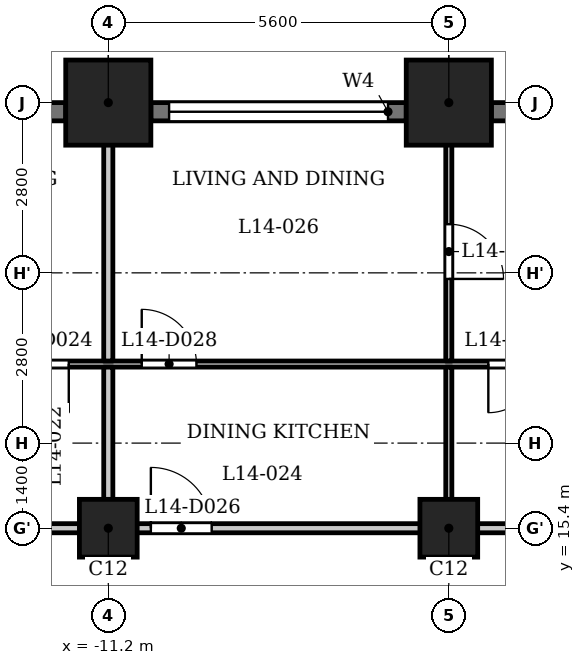
"""IFC4 building model, lengths in metres.
Left out: names, types, materials, properties, quantities, classifications, styles, units other than length and angle.
Written with IfcOpenShell. Run it as: python <this file> out.ifc"""

import sys

from ifc_helpers import new_model, si_unit, direction, frame, frame_2d, origin, origin_2d, place, context, subcontext, project, spatial, rectangle, extrude, element, fill, save


model = new_model("IFC4")
c1 = context("Model", 3, precision=1e-05, world=origin(), true_north=direction((0.0, 1.0)))
c2 = subcontext(c1, "Body", "Model", "MODEL_VIEW")
j1 = project(units=[si_unit("LENGTHUNIT", "METRE"), si_unit("PLANEANGLEUNIT", "RADIAN")], contexts=[c1])
p1 = place(None, origin())
s1 = spatial("IfcSite", under=j1, at=p1, CompositionType="ELEMENT")
p2 = place(p1, origin())
s2 = spatial("IfcBuilding", under=s1, at=p2, CompositionType="ELEMENT")
p3 = place(p2, frame((0.0, 0.0, 58.5)))
s3 = spatial("IfcBuildingStorey", under=s2, at=p3, CompositionType="ELEMENT", Elevation=58.5)
for number, where, z_axis, x_axis in (
    (1, (-5.6, 22.4, 0.0), (0.0, 0.0, 1.0), (1.0, 0.0, 0.0)),
    (2, (-11.2, 22.4, 0.0), (0.0, 0.0, 1.0), (1.0, 0.0, 0.0)),
):
    element("IfcColumn", number, at=place(p3, frame(where, z_axis=z_axis, x_axis=x_axis)), inside=s3, PredefinedType="COLUMN", context=c2, shape_type="SweptSolid", body=[
        extrude(rectangle(XDim=1.4, YDim=1.4, at=origin_2d()), origin(), (0.0, 0.0, 1.0), 3.5),
    ])
for number, where, z_axis, x_axis in (
    (3, (-11.2, 15.4, 0.0), (0.0, 0.0, 1.0), (1.0, 0.0, 0.0)),
    (4, (-5.6, 15.4, 0.0), (0.0, 0.0, 1.0), (1.0, 0.0, 0.0)),
):
    element("IfcColumn", number, at=place(p3, frame(where, z_axis=z_axis, x_axis=x_axis)), inside=s3, PredefinedType="COLUMN", context=c2, shape_type="SweptSolid", body=[
        extrude(rectangle(XDim=0.95, YDim=0.95, at=origin_2d()), origin(), (0.0, 0.0, 1.0), 3.5),
    ])
p4 = place(p3, frame((-0.7, 22.25, 0.0), z_axis=(0.0, 0.0, 1.0), x_axis=(-1.0, 0.0, 0.0)))
e5 = element("IfcWall", 5, at=p4, inside=s3, PredefinedType="SOLIDWALL", context=c2, shape_type="SweptSolid", body=[
    extrude(rectangle(XDim=4.2, YDim=0.3, at=frame_2d((2.1, 0.0))), origin(), (0.0, 0.0, 1.0), 2.35),
])
p5 = place(p4, frame((0.3, 0.0, 1.2)))
e6 = element("IfcOpeningElement", 6, at=p5, cuts=e5, PredefinedType="OPENING", context=c2, shape_type="SweptSolid", body=[
    extrude(rectangle(XDim=3.6, YDim=0.95, at=frame_2d((1.8, 0.475))), frame((0.0, 0.16, 0.0), z_axis=(0.0, -1.0, 0.0), x_axis=(1.0, 0.0, 0.0)), (0.0, 0.0, 1.0), 0.32),
])
p6 = place(p3, frame((-6.3, 22.25, 0.0), z_axis=(0.0, 0.0, 1.0), x_axis=(-1.0, 0.0, 0.0)))
e7 = element("IfcWall", 7, at=p6, inside=s3, PredefinedType="SOLIDWALL", context=c2, shape_type="SweptSolid", body=[
    extrude(rectangle(XDim=4.2, YDim=0.3, at=frame_2d((2.1, 0.0))), origin(), (0.0, 0.0, 1.0), 2.35),
])
p7 = place(p6, frame((0.3, 0.0, 1.2)))
e8 = element("IfcOpeningElement", 8, at=p7, cuts=e7, PredefinedType="OPENING", context=c2, shape_type="SweptSolid", body=[
    extrude(rectangle(XDim=3.6, YDim=0.95, at=frame_2d((1.8, 0.475))), frame((0.0, 0.16, 0.0), z_axis=(0.0, -1.0, 0.0), x_axis=(1.0, 0.0, 0.0)), (0.0, 0.0, 1.0), 0.32),
])
p8 = place(p3, frame((-11.9, 22.25, 0.0), z_axis=(0.0, 0.0, 1.0), x_axis=(-1.0, 0.0, 0.0)))
e9 = element("IfcWall", 9, at=p8, inside=s3, PredefinedType="SOLIDWALL", context=c2, shape_type="SweptSolid", body=[
    extrude(rectangle(XDim=4.2, YDim=0.3, at=frame_2d((2.1, 0.0))), origin(), (0.0, 0.0, 1.0), 2.35),
])
p9 = place(p8, frame((0.3, 0.0, 1.2)))
e10 = element("IfcOpeningElement", 10, at=p9, cuts=e9, PredefinedType="OPENING", context=c2, shape_type="SweptSolid", body=[
    extrude(rectangle(XDim=3.6, YDim=0.95, at=frame_2d((1.8, 0.475))), frame((0.0, 0.16, 0.0), z_axis=(0.0, -1.0, 0.0), x_axis=(1.0, 0.0, 0.0)), (0.0, 0.0, 1.0), 0.32),
])
p10 = place(p3, frame((-27.484, 15.4, 0.0), z_axis=(0.0, 0.0, 1.0), x_axis=(1.0, 0.0, 0.0)))
e11 = element("IfcWall", 11, at=p10, inside=s3, PredefinedType="PARTITIONING", context=c2, shape_type="SweptSolid", body=[
    extrude(rectangle(XDim=54.968, YDim=0.15, at=frame_2d((27.484, 0.0))), origin(), (0.0, 0.0, 1.0), 3.2),
])
p11 = place(p10, frame((8.784, 0.0, 0.0)))
e12 = element("IfcOpeningElement", 12, at=p11, cuts=e11, PredefinedType="OPENING", context=c2, shape_type="SweptSolid", body=[
    extrude(rectangle(XDim=1.0, YDim=2.1, at=frame_2d((0.5, 1.05))), frame((0.0, 0.085, 0.0), z_axis=(0.0, -1.0, 0.0), x_axis=(1.0, 0.0, 0.0)), (0.0, 0.0, 1.0), 0.17),
])
p12 = place(p10, frame((12.034, 0.0, 0.0)))
e13 = element("IfcOpeningElement", 13, at=p12, cuts=e11, PredefinedType="OPENING", context=c2, shape_type="SweptSolid", body=[
    extrude(rectangle(XDim=1.0, YDim=2.1, at=frame_2d((0.5, 1.05))), frame((0.0, 0.085, 0.0), z_axis=(0.0, -1.0, 0.0), x_axis=(1.0, 0.0, 0.0)), (0.0, 0.0, 1.0), 0.17),
])
p13 = place(p10, frame((16.984, 0.0, 0.0)))
e14 = element("IfcOpeningElement", 14, at=p13, cuts=e11, PredefinedType="OPENING", context=c2, shape_type="SweptSolid", body=[
    extrude(rectangle(XDim=1.0, YDim=2.1, at=frame_2d((0.5, 1.05))), frame((0.0, 0.085, 0.0), z_axis=(0.0, -1.0, 0.0), x_axis=(1.0, 0.0, 0.0)), (0.0, 0.0, 1.0), 0.17),
])
p14 = place(p10, frame((28.184, 0.0, 0.0)))
e15 = element("IfcOpeningElement", 15, at=p14, cuts=e11, PredefinedType="OPENING", context=c2, shape_type="SweptSolid", body=[
    extrude(rectangle(XDim=1.0, YDim=2.1, at=frame_2d((0.5, 1.05))), frame((0.0, 0.085, 0.0), z_axis=(0.0, -1.0, 0.0), x_axis=(1.0, 0.0, 0.0)), (0.0, 0.0, 1.0), 0.17),
])
p15 = place(p10, frame((48.234, 0.0, 0.0)))
e16 = element("IfcOpeningElement", 16, at=p15, cuts=e11, PredefinedType="OPENING", context=c2, shape_type="SweptSolid", body=[
    extrude(rectangle(XDim=1.0, YDim=2.1, at=frame_2d((0.5, 1.05))), frame((0.0, 0.085, 0.0), z_axis=(0.0, -1.0, 0.0), x_axis=(1.0, 0.0, 0.0)), (0.0, 0.0, 1.0), 0.17),
])
p16 = place(p3, frame((-26.44, 18.1, 0.0), z_axis=(0.0, 0.0, 1.0), x_axis=(1.0, 0.0, 0.0)))
e17 = element("IfcWall", 17, at=p16, inside=s3, PredefinedType="PARTITIONING", context=c2, shape_type="SweptSolid", body=[
    extrude(rectangle(XDim=52.63, YDim=0.1, at=frame_2d((26.315, 0.0))), origin(), (0.0, 0.0, 1.0), 3.2),
])
p17 = place(p16, frame((2.626, 0.0, 0.0)))
e18 = element("IfcOpeningElement", 18, at=p17, cuts=e17, PredefinedType="OPENING", context=c2, shape_type="SweptSolid", body=[
    extrude(rectangle(XDim=0.8, YDim=2.1, at=frame_2d((0.4, 1.05))), frame((0.0, 0.06, 0.0), z_axis=(0.0, -1.0, 0.0), x_axis=(1.0, 0.0, 0.0)), (0.0, 0.0, 1.0), 0.12),
])
p18 = place(p16, frame((7.84, 0.0, 0.0)))
e19 = element("IfcOpeningElement", 19, at=p18, cuts=e17, PredefinedType="OPENING", context=c2, shape_type="SweptSolid", body=[
    extrude(rectangle(XDim=0.9, YDim=2.1, at=frame_2d((0.45, 1.05))), frame((0.0, 0.06, 0.0), z_axis=(0.0, -1.0, 0.0), x_axis=(1.0, 0.0, 0.0)), (0.0, 0.0, 1.0), 0.12),
])
p19 = place(p16, frame((13.79, 0.0, 0.0)))
e20 = element("IfcOpeningElement", 20, at=p19, cuts=e17, PredefinedType="OPENING", context=c2, shape_type="SweptSolid", body=[
    extrude(rectangle(XDim=0.8, YDim=2.1, at=frame_2d((0.4, 1.05))), frame((0.0, 0.06, 0.0), z_axis=(0.0, -1.0, 0.0), x_axis=(1.0, 0.0, 0.0)), (0.0, 0.0, 1.0), 0.12),
])
p20 = place(p16, frame((11.09, 0.0, 0.0)))
e21 = element("IfcOpeningElement", 21, at=p20, cuts=e17, PredefinedType="OPENING", context=c2, shape_type="SweptSolid", body=[
    extrude(rectangle(XDim=0.9, YDim=2.1, at=frame_2d((0.45, 1.05))), frame((0.0, 0.06, 0.0), z_axis=(0.0, -1.0, 0.0), x_axis=(1.0, 0.0, 0.0)), (0.0, 0.0, 1.0), 0.12),
])
p21 = place(p16, frame((21.49, 0.0, 0.0)))
e22 = element("IfcOpeningElement", 22, at=p21, cuts=e17, PredefinedType="OPENING", context=c2, shape_type="SweptSolid", body=[
    extrude(rectangle(XDim=0.8, YDim=2.1, at=frame_2d((0.4, 1.05))), frame((0.0, 0.06, 0.0), z_axis=(0.0, -1.0, 0.0), x_axis=(1.0, 0.0, 0.0)), (0.0, 0.0, 1.0), 0.12),
])
p22 = place(p16, frame((15.79, 0.0, 0.0)))
e23 = element("IfcOpeningElement", 23, at=p22, cuts=e17, PredefinedType="OPENING", context=c2, shape_type="SweptSolid", body=[
    extrude(rectangle(XDim=0.9, YDim=2.1, at=frame_2d((0.45, 1.05))), frame((0.0, 0.06, 0.0), z_axis=(0.0, -1.0, 0.0), x_axis=(1.0, 0.0, 0.0)), (0.0, 0.0, 1.0), 0.12),
])
p23 = place(p16, frame((27.49, 0.0, 0.0)))
e24 = element("IfcOpeningElement", 24, at=p23, cuts=e17, PredefinedType="OPENING", context=c2, shape_type="SweptSolid", body=[
    extrude(rectangle(XDim=0.9, YDim=2.1, at=frame_2d((0.45, 1.05))), frame((0.0, 0.06, 0.0), z_axis=(0.0, -1.0, 0.0), x_axis=(1.0, 0.0, 0.0)), (0.0, 0.0, 1.0), 0.12),
])
p24 = place(p16, frame((29.74, 0.0, 0.0)))
e25 = element("IfcOpeningElement", 25, at=p24, cuts=e17, PredefinedType="OPENING", context=c2, shape_type="SweptSolid", body=[
    extrude(rectangle(XDim=0.9, YDim=2.1, at=frame_2d((0.45, 1.05))), frame((0.0, 0.06, 0.0), z_axis=(0.0, -1.0, 0.0), x_axis=(1.0, 0.0, 0.0)), (0.0, 0.0, 1.0), 0.12),
])
p25 = place(p16, frame((35.84, 0.0, 0.0)))
e26 = element("IfcOpeningElement", 26, at=p25, cuts=e17, PredefinedType="OPENING", context=c2, shape_type="SweptSolid", body=[
    extrude(rectangle(XDim=0.9, YDim=2.1, at=frame_2d((0.45, 1.05))), frame((0.0, 0.06, 0.0), z_axis=(0.0, -1.0, 0.0), x_axis=(1.0, 0.0, 0.0)), (0.0, 0.0, 1.0), 0.12),
])
p26 = place(p16, frame((50.74, 0.0, 0.0)))
e27 = element("IfcOpeningElement", 27, at=p26, cuts=e17, PredefinedType="OPENING", context=c2, shape_type="SweptSolid", body=[
    extrude(rectangle(XDim=0.8, YDim=2.1, at=frame_2d((0.4, 1.05))), frame((0.0, 0.06, 0.0), z_axis=(0.0, -1.0, 0.0), x_axis=(1.0, 0.0, 0.0)), (0.0, 0.0, 1.0), 0.12),
])
p27 = place(p16, frame((47.29, 0.0, 0.0)))
e28 = element("IfcOpeningElement", 28, at=p27, cuts=e17, PredefinedType="OPENING", context=c2, shape_type="SweptSolid", body=[
    extrude(rectangle(XDim=0.9, YDim=2.1, at=frame_2d((0.45, 1.05))), frame((0.0, 0.06, 0.0), z_axis=(0.0, -1.0, 0.0), x_axis=(1.0, 0.0, 0.0)), (0.0, 0.0, 1.0), 0.12),
])
p28 = place(p3, frame((-11.2, 15.475, 0.0), z_axis=(0.0, 0.0, 1.0), x_axis=(0.0, 1.0, 0.0)))
e29 = element("IfcWall", 29, at=p28, inside=s3, PredefinedType="PARTITIONING", context=c2, shape_type="SweptSolid", body=[
    extrude(rectangle(XDim=2.575, YDim=0.15, at=frame_2d((1.288, 0.0))), origin(), (0.0, 0.0, 1.0), 3.2),
])
p29 = place(p3, frame((-11.2, 18.15, 0.0), z_axis=(0.0, 0.0, 1.0), x_axis=(0.0, 1.0, 0.0)))
e30 = element("IfcWall", 30, at=p29, inside=s3, PredefinedType="PARTITIONING", context=c2, shape_type="SweptSolid", body=[
    extrude(rectangle(XDim=4.93, YDim=0.15, at=frame_2d((2.465, 0.0))), origin(), (0.0, 0.0, 1.0), 3.2),
])
p30 = place(p3, frame((-5.6, 15.475, 0.0), z_axis=(0.0, 0.0, 1.0), x_axis=(0.0, 1.0, 0.0)))
e31 = element("IfcWall", 31, at=p30, inside=s3, PredefinedType="PARTITIONING", context=c2, shape_type="SweptSolid", body=[
    extrude(rectangle(XDim=2.575, YDim=0.1, at=frame_2d((1.288, 0.0))), origin(), (0.0, 0.0, 1.0), 3.2),
])
p31 = place(p3, frame((-5.6, 18.15, 0.0), z_axis=(0.0, 0.0, 1.0), x_axis=(0.0, 1.0, 0.0)))
e32 = element("IfcWall", 32, at=p31, inside=s3, PredefinedType="PARTITIONING", context=c2, shape_type="SweptSolid", body=[
    extrude(rectangle(XDim=4.93, YDim=0.1, at=frame_2d((2.465, 0.0))), origin(), (0.0, 0.0, 1.0), 3.2),
])
p32 = place(p31, frame((1.35, 0.0, 0.0)))
e33 = element("IfcOpeningElement", 33, at=p32, cuts=e32, PredefinedType="OPENING", context=c2, shape_type="SweptSolid", body=[
    extrude(rectangle(XDim=0.9, YDim=2.1, at=frame_2d((0.45, 1.05))), frame((0.0, 0.06, 0.0), z_axis=(0.0, -1.0, 0.0), x_axis=(1.0, 0.0, 0.0)), (0.0, 0.0, 1.0), 0.12),
])
p33 = place(p19, origin())
e34 = element("IfcDoor", 34, at=p33, inside=s3, OperationType="SINGLE_SWING_RIGHT", PredefinedType="DOOR", context=c2, shape_type="SweptSolid", body=[
    extrude(rectangle(XDim=0.8, YDim=2.1, at=frame_2d((0.4, 1.05))), frame((0.0, 0.025, 0.0), z_axis=(0.0, -1.0, 0.0), x_axis=(1.0, 0.0, 0.0)), (0.0, 0.0, 1.0), 0.05),
])
fill(e20, e34)
p34 = place(p13, origin())
e35 = element("IfcDoor", 35, at=p34, inside=s3, OperationType="SINGLE_SWING_RIGHT", PredefinedType="DOOR", context=c2, shape_type="SweptSolid", body=[
    extrude(rectangle(XDim=1.0, YDim=2.1, at=frame_2d((0.5, 1.05))), frame((0.0, 0.025, 0.0), z_axis=(0.0, -1.0, 0.0), x_axis=(1.0, 0.0, 0.0)), (0.0, 0.0, 1.0), 0.05),
])
fill(e14, e35)
p35 = place(p21, origin())
e36 = element("IfcDoor", 36, at=p35, inside=s3, OperationType="SINGLE_SWING_LEFT", PredefinedType="DOOR", context=c2, shape_type="SweptSolid", body=[
    extrude(rectangle(XDim=0.8, YDim=2.1, at=frame_2d((0.4, 1.05))), frame((0.0, 0.025, 0.0), z_axis=(0.0, -1.0, 0.0), x_axis=(1.0, 0.0, 0.0)), (0.0, 0.0, 1.0), 0.05),
])
fill(e22, e36)
p36 = place(p22, origin())
e37 = element("IfcDoor", 37, at=p36, inside=s3, OperationType="SINGLE_SWING_RIGHT", PredefinedType="DOOR", context=c2, shape_type="SweptSolid", body=[
    extrude(rectangle(XDim=0.9, YDim=2.1, at=frame_2d((0.45, 1.05))), frame((0.0, 0.025, 0.0), z_axis=(0.0, -1.0, 0.0), x_axis=(1.0, 0.0, 0.0)), (0.0, 0.0, 1.0), 0.05),
])
fill(e23, e37)
p37 = place(p32, origin())
e38 = element("IfcDoor", 38, at=p37, inside=s3, OperationType="SINGLE_SWING_LEFT", PredefinedType="DOOR", context=c2, shape_type="SweptSolid", body=[
    extrude(rectangle(XDim=0.9, YDim=2.1, at=frame_2d((0.45, 1.05))), frame((0.0, 0.025, 0.0), z_axis=(0.0, -1.0, 0.0), x_axis=(1.0, 0.0, 0.0)), (0.0, 0.0, 1.0), 0.05),
])
fill(e33, e38)
p38 = place(p7, origin())
e39 = element("IfcWindow", 39, at=p38, inside=s3, PartitioningType="SINGLE_PANEL", PredefinedType="WINDOW", context=c2, shape_type="SweptSolid", body=[
    extrude(rectangle(XDim=3.6, YDim=0.95, at=frame_2d((1.8, 0.475))), frame((0.0, 0.03, 0.0), z_axis=(0.0, -1.0, 0.0), x_axis=(1.0, 0.0, 0.0)), (0.0, 0.0, 1.0), 0.06),
])
fill(e8, e39)
save(model, sys.argv[1])
